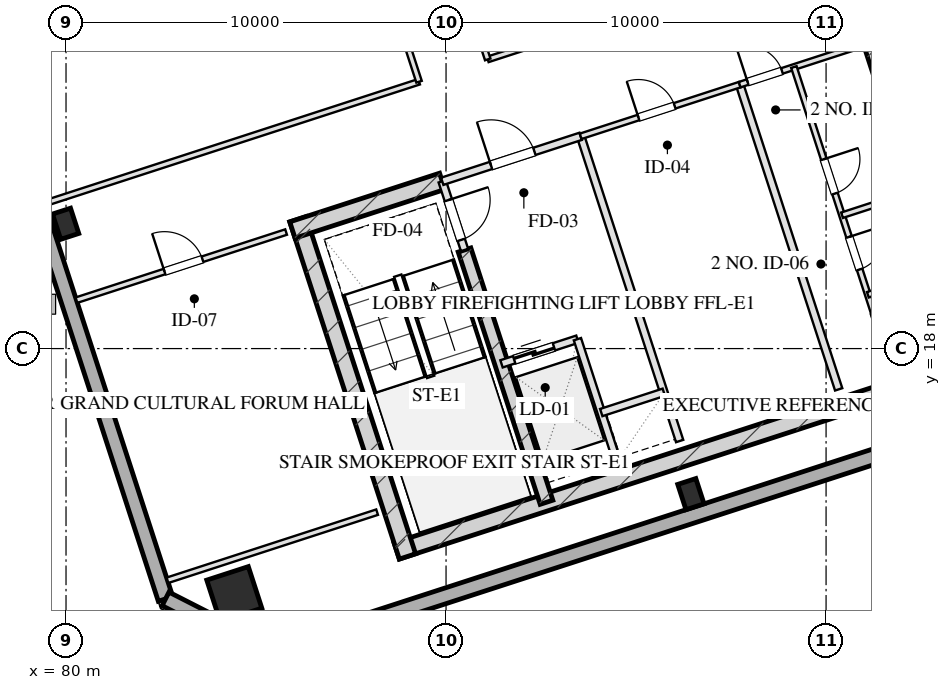
"""IFC4 building model, lengths in metres.
Left out: names, types, materials, properties, quantities, classifications, styles, units other than length and angle.
Written with IfcOpenShell. Run it as: python <this file> out.ifc"""

import sys

from ifc_helpers import new_model, si_unit, direction, frame, frame_2d, origin, origin_2d, place, context, subcontext, project, spatial, rectangle, hollow_rectangle, extrude, element, fill, save


model = new_model("IFC4")
c1 = context("Model", 3, precision=1e-05, world=origin(), true_north=direction((0.0, 1.0)))
c2 = subcontext(c1, "Body", "Model", "MODEL_VIEW")
j1 = project(units=[si_unit("LENGTHUNIT", "METRE"), si_unit("PLANEANGLEUNIT", "RADIAN")], contexts=[c1])
p1 = place(None, origin())
s1 = spatial("IfcSite", under=j1, at=p1, CompositionType="ELEMENT")
p2 = place(p1, origin())
s2 = spatial("IfcBuilding", under=s1, at=p2, CompositionType="ELEMENT")
p3 = place(p2, frame((0.0, 0.0, 205.85)))
s3 = spatial("IfcBuildingStorey", under=s2, at=p3, CompositionType="ELEMENT", Elevation=205.85)
p4 = place(p3, frame((88.701, 12.675, 0.0), z_axis=(0.0, 0.0, 1.0), x_axis=(0.95105824505, 0.309011673763, 0.0)))
e1 = element("IfcWall", 1, at=p4, inside=s3, PredefinedType="SHEAR", context=c2, shape_type="SweptSolid", body=[
    extrude(rectangle(XDim=16.25, YDim=0.45, at=frame_2d((8.125, 0.0))), origin(), (0.0, 0.0, 1.0), 3.45),
])
for number, where, z_axis, x_axis in (
    (2, (86.102, 21.404, 0.0), (0.0, 0.0, 1.0), (0.309, -0.951, 0.0)),
    (3, (101.128, 26.286, 0.0), (0.0, 0.0, 1.0), (0.309, -0.951, 0.0)),
):
    element("IfcWall", number, at=place(p3, frame(where, z_axis=z_axis, x_axis=x_axis)), inside=s3, PredefinedType="SHEAR", context=c2, shape_type="SweptSolid", body=[
        extrude(rectangle(XDim=9.33, YDim=0.45, at=frame_2d((4.665, 0.0))), origin(), (0.0, 0.0, 1.0), 3.45),
    ])
p5 = place(p3, frame((90.486, 20.594, 0.0), z_axis=(0.0, 0.0, 1.0), x_axis=(0.309020428229, -0.951055400562, 0.0)))
e4 = element("IfcWall", 4, at=p5, inside=s3, PredefinedType="SHEAR", context=c2, shape_type="SweptSolid", body=[
    extrude(rectangle(XDim=6.98, YDim=0.35, at=frame_2d((3.49, 0.0))), origin(), (0.0, 0.0, 1.0), 3.45),
])
p6 = place(p3, frame((85.957, 21.12, 0.0), z_axis=(0.0, 0.0, 1.0), x_axis=(0.951064796122, 0.308991510526, 0.0)))
e5 = element("IfcWall", 5, at=p6, inside=s3, PredefinedType="SHEAR", context=c2, shape_type="SweptSolid", body=[
    extrude(rectangle(XDim=4.145, YDim=0.45, at=frame_2d((2.073, 0.0))), origin(), (0.0, 0.0, 1.0), 3.45),
])
p7 = place(p3, frame((84.428, 11.539, 0.0), z_axis=(0.0, 0.0, 1.0), x_axis=(0.951056516295, 0.309016994375, 0.0)))
e6 = element("IfcColumn", 6, at=p7, inside=s3, PredefinedType="COLUMN", context=c2, shape_type="SweptSolid", body=[
    extrude(hollow_rectangle(XDim=1.15, YDim=1.15, WallThickness=0.04, at=origin_2d()), origin(), (0.0, 0.0, 1.0), 3.451),
])
for number, where, z_axis, x_axis in (
    (7, (79.99, 21.284, 0.0), (0.0, 0.0, 1.0), (0.951, 0.309, 0.0)),
    (8, (96.443, 14.17, 0.0), (0.0, 0.0, 1.0), (0.951, 0.309, 0.0)),
):
    element("IfcColumn", number, at=place(p3, frame(where, z_axis=z_axis, x_axis=x_axis)), inside=s3, PredefinedType="COLUMN", context=c2, shape_type="SweptSolid", body=[
        extrude(hollow_rectangle(XDim=0.5, YDim=0.7, WallThickness=0.025, at=origin_2d()), origin(), (0.0, 0.0, 1.0), 3.451),
    ])
p8 = place(p3, frame((82.618, 11.414, 0.0), z_axis=(0.0, 0.0, 1.0), x_axis=(-0.309016491071, 0.951056679828, 0.0)))
e9 = element("IfcWall", 9, at=p8, inside=s3, PredefinedType="SOLIDWALL", context=c2, shape_type="SweptSolid", body=[
    extrude(rectangle(XDim=38.4, YDim=0.4, at=frame_2d((19.2, 0.0))), origin(), (0.0, 0.0, 1.0), 2.61),
])
p9 = place(p8, frame((11.75, 0.0, 0.75)))
e10 = element("IfcOpeningElement", 10, at=p9, cuts=e9, PredefinedType="OPENING", context=c2, shape_type="SweptSolid", body=[
    extrude(rectangle(XDim=2.1, YDim=1.46, at=frame_2d((1.05, 0.73))), frame((0.0, 0.21, 0.0), z_axis=(0.0, -1.0, 0.0), x_axis=(1.0, 0.0, 0.0)), (0.0, 0.0, 1.0), 0.42),
])
p10 = place(p8, frame((15.55, 0.0, 0.75)))
e11 = element("IfcOpeningElement", 11, at=p10, cuts=e9, PredefinedType="OPENING", context=c2, shape_type="SweptSolid", body=[
    extrude(rectangle(XDim=2.1, YDim=1.46, at=frame_2d((1.05, 0.73))), frame((0.0, 0.21, 0.0), z_axis=(0.0, -1.0, 0.0), x_axis=(1.0, 0.0, 0.0)), (0.0, 0.0, 1.0), 0.42),
])
p11 = place(p8, frame((23.05, 0.0, 0.0)))
e12 = element("IfcOpeningElement", 12, at=p11, cuts=e9, PredefinedType="OPENING", context=c2, shape_type="SweptSolid", body=[
    extrude(rectangle(XDim=1.1, YDim=2.15, at=frame_2d((0.55, 1.075))), frame((0.0, 0.21, 0.0), z_axis=(0.0, -1.0, 0.0), x_axis=(1.0, 0.0, 0.0)), (0.0, 0.0, 1.0), 0.42),
])
p12 = place(p3, frame((97.382, 56.586, 0.0), z_axis=(0.0, 0.0, 1.0), x_axis=(0.309016491071, -0.951056679828, 0.0)))
e13 = element("IfcWall", 13, at=p12, inside=s3, PredefinedType="SOLIDWALL", context=c2, shape_type="SweptSolid", body=[
    extrude(rectangle(XDim=38.4, YDim=0.4, at=frame_2d((19.2, 0.0))), origin(), (0.0, 0.0, 1.0), 2.61),
])
p13 = place(p12, frame((24.55, 0.0, 0.75)))
e14 = element("IfcOpeningElement", 14, at=p13, cuts=e13, PredefinedType="OPENING", context=c2, shape_type="SweptSolid", body=[
    extrude(rectangle(XDim=2.1, YDim=1.46, at=frame_2d((1.05, 0.73))), frame((0.0, 0.21, 0.0), z_axis=(0.0, -1.0, 0.0), x_axis=(1.0, 0.0, 0.0)), (0.0, 0.0, 1.0), 0.42),
])
p14 = place(p12, frame((20.75, 0.0, 0.75)))
e15 = element("IfcOpeningElement", 15, at=p14, cuts=e13, PredefinedType="OPENING", context=c2, shape_type="SweptSolid", body=[
    extrude(rectangle(XDim=2.1, YDim=1.46, at=frame_2d((1.05, 0.73))), frame((0.0, 0.21, 0.0), z_axis=(0.0, -1.0, 0.0), x_axis=(1.0, 0.0, 0.0)), (0.0, 0.0, 1.0), 0.42),
])
p15 = place(p12, frame((16.05, 0.0, 0.0)))
e16 = element("IfcOpeningElement", 16, at=p15, cuts=e13, PredefinedType="OPENING", context=c2, shape_type="SweptSolid", body=[
    extrude(rectangle(XDim=1.1, YDim=2.15, at=frame_2d((0.55, 1.075))), frame((0.0, 0.21, 0.0), z_axis=(0.0, -1.0, 0.0), x_axis=(1.0, 0.0, 0.0)), (0.0, 0.0, 1.0), 0.42),
])
p16 = place(p3, frame((107.835, 17.294, 0.0), z_axis=(0.0, 0.0, 1.0), x_axis=(-0.951058012937, -0.309012388148, 0.0)))
e17 = element("IfcWall", 17, at=p16, inside=s3, PredefinedType="SOLIDWALL", context=c2, shape_type="SweptSolid", body=[
    extrude(rectangle(XDim=23.6, YDim=0.4, at=frame_2d((11.8, 0.0))), origin(), (0.0, 0.0, 1.0), 2.61),
])
p17 = place(p3, frame((85.39, 10.001, 0.0), z_axis=(0.0, 0.0, 1.0), x_axis=(-0.890979603174, 0.454043331334, 0.0)))
e18 = element("IfcWall", 18, at=p17, inside=s3, PredefinedType="SOLIDWALL", context=c2, shape_type="SweptSolid", body=[
    extrude(rectangle(XDim=3.111, YDim=0.4, at=frame_2d((1.556, 0.0))), origin(), (0.0, 0.0, 1.0), 2.61),
])
p18 = place(p3, frame((89.899, 22.401, 0.0), z_axis=(0.0, 0.0, 1.0), x_axis=(0.308932062672, -0.951084108086, 0.0)))
e19 = element("IfcWall", 19, at=p18, inside=s3, PredefinedType="PARTITIONING", context=c2, shape_type="SweptSolid", body=[
    extrude(rectangle(XDim=1.9, YDim=0.2, at=frame_2d((0.95, 0.0))), origin(), (0.0, 0.0, 1.0), 3.175),
])
p19 = place(p18, frame((0.52, 0.0, 0.0)))
e20 = element("IfcOpeningElement", 20, at=p19, cuts=e19, PredefinedType="OPENING", context=c2, shape_type="SweptSolid", body=[
    extrude(rectangle(XDim=1.1, YDim=2.05, at=frame_2d((0.55, 1.025))), frame((0.0, 0.11, 0.0), z_axis=(0.0, -1.0, 0.0), x_axis=(1.0, 0.0, 0.0)), (0.0, 0.0, 1.0), 0.22),
])
p20 = place(p3, frame((93.542, 23.585, 0.0), z_axis=(0.0, 0.0, 1.0), x_axis=(0.309042196757, -0.951048327176, 0.0)))
e21 = element("IfcWall", 21, at=p20, inside=s3, PredefinedType="PARTITIONING", context=c2, shape_type="SweptSolid", body=[
    extrude(rectangle(XDim=8.43, YDim=0.2, at=frame_2d((4.215, 0.0))), origin(), (0.0, 0.0, 1.0), 3.175),
])
p21 = place(p3, frame((89.899, 22.401, 0.0), z_axis=(0.0, 0.0, 1.0), x_axis=(0.951046716504, 0.309047153403, 0.0)))
e22 = element("IfcWall", 22, at=p21, inside=s3, PredefinedType="PARTITIONING", context=c2, shape_type="SweptSolid", body=[
    extrude(rectangle(XDim=3.83, YDim=0.2, at=frame_2d((1.915, 0.0))), origin(), (0.0, 0.0, 1.0), 3.175),
])
p22 = place(p21, frame((1.35, 0.0, 0.0)))
e23 = element("IfcOpeningElement", 23, at=p22, cuts=e22, PredefinedType="OPENING", context=c2, shape_type="SweptSolid", body=[
    extrude(rectangle(XDim=1.2, YDim=2.05, at=frame_2d((0.6, 1.025))), frame((0.0, 0.11, 0.0), z_axis=(0.0, -1.0, 0.0), x_axis=(1.0, 0.0, 0.0)), (0.0, 0.0, 1.0), 0.22),
])
p23 = place(p3, frame((91.46, 17.598, 0.0), z_axis=(0.0, 0.0, 1.0), x_axis=(0.951062257173, 0.308999325213, 0.0)))
e24 = element("IfcWall", 24, at=p23, inside=s3, PredefinedType="PARTITIONING", context=c2, shape_type="SweptSolid", body=[
    extrude(rectangle(XDim=2.1, YDim=0.2, at=frame_2d((1.05, 0.0))), origin(), (0.0, 0.0, 1.0), 3.175),
])
p24 = place(p23, frame((0.35, 0.0, 0.0)))
e25 = element("IfcOpeningElement", 25, at=p24, cuts=e24, PredefinedType="OPENING", context=c2, shape_type="SweptSolid", body=[
    extrude(rectangle(XDim=1.1, YDim=2.05, at=frame_2d((0.55, 1.025))), frame((0.0, 0.11, 0.0), z_axis=(0.0, -1.0, 0.0), x_axis=(1.0, 0.0, 0.0)), (0.0, 0.0, 1.0), 0.22),
])
p25 = place(p3, frame((93.457, 18.247, 0.0), z_axis=(0.0, 0.0, 1.0), x_axis=(0.3089935693, -0.951064127245, 0.0)))
e26 = element("IfcWall", 26, at=p25, inside=s3, PredefinedType="PARTITIONING", context=c2, shape_type="SweptSolid", body=[
    extrude(rectangle(XDim=3.7, YDim=0.2, at=frame_2d((1.85, 0.0))), origin(), (0.0, 0.0, 1.0), 3.175),
])
p26 = place(p3, frame((94.084, 16.317, 0.0), z_axis=(0.0, 0.0, 1.0), x_axis=(0.951041328149, 0.309063734775, 0.0)))
e27 = element("IfcWall", 27, at=p26, inside=s3, PredefinedType="PARTITIONING", context=c2, shape_type="SweptSolid", body=[
    extrude(rectangle(XDim=1.73, YDim=0.2, at=frame_2d((0.865, 0.0))), origin(), (0.0, 0.0, 1.0), 3.175),
])
p27 = place(p3, frame((97.727, 24.944, 0.0), z_axis=(0.0, 0.0, 1.0), x_axis=(0.309016001439, -0.951056838919, 0.0)))
e28 = element("IfcWall", 28, at=p27, inside=s3, PredefinedType="PARTITIONING", context=c2, shape_type="SweptSolid", body=[
    extrude(rectangle(XDim=8.43, YDim=0.2, at=frame_2d((4.215, 0.0))), origin(), (0.0, 0.0, 1.0), 3.175),
])
p28 = place(p3, frame((93.542, 23.585, 0.0), z_axis=(0.0, 0.0, 1.0), x_axis=(0.951063829732, 0.308994485023, 0.0)))
e29 = element("IfcWall", 29, at=p28, inside=s3, PredefinedType="PARTITIONING", context=c2, shape_type="SweptSolid", body=[
    extrude(rectangle(XDim=4.4, YDim=0.15, at=frame_2d((2.2, 0.0))), origin(), (0.0, 0.0, 1.0), 3.175),
])
p29 = place(p28, frame((1.6, 0.0, 0.0)))
e30 = element("IfcOpeningElement", 30, at=p29, cuts=e29, PredefinedType="OPENING", context=c2, shape_type="SweptSolid", body=[
    extrude(rectangle(XDim=1.0, YDim=2.05, at=frame_2d((0.5, 1.025))), frame((0.0, 0.085, 0.0), z_axis=(0.0, -1.0, 0.0), x_axis=(1.0, 0.0, 0.0)), (0.0, 0.0, 1.0), 0.17),
])
p30 = place(p3, frame((97.727, 24.944, 0.0), z_axis=(0.0, 0.0, 1.0), x_axis=(0.951036872128, 0.309077446369, 0.0)))
e31 = element("IfcWall", 31, at=p30, inside=s3, PredefinedType="PARTITIONING", context=c2, shape_type="SweptSolid", body=[
    extrude(rectangle(XDim=3.2, YDim=0.15, at=frame_2d((1.6, 0.0))), origin(), (0.0, 0.0, 1.0), 3.175),
])
p31 = place(p30, frame((0.22, 0.0, 0.0)))
e32 = element("IfcOpeningElement", 32, at=p31, cuts=e31, PredefinedType="OPENING", context=c2, shape_type="SweptSolid", body=[
    extrude(rectangle(XDim=0.95, YDim=2.05, at=frame_2d((0.475, 1.025))), frame((0.0, 0.085, 0.0), z_axis=(0.0, -1.0, 0.0), x_axis=(1.0, 0.0, 0.0)), (0.0, 0.0, 1.0), 0.17),
])
p32 = place(p3, frame((99.153, 25.408, 0.0), z_axis=(0.0, 0.0, 1.0), x_axis=(0.309016001439, -0.951056838919, 0.0)))
e33 = element("IfcWall", 33, at=p32, inside=s3, PredefinedType="PARTITIONING", context=c2, shape_type="SweptSolid", body=[
    extrude(rectangle(XDim=8.43, YDim=0.15, at=frame_2d((4.215, 0.0))), origin(), (0.0, 0.0, 1.0), 3.175),
])
p33 = place(p32, frame((2.55, 0.0, 0.0)))
e34 = element("IfcOpeningElement", 34, at=p33, cuts=e33, PredefinedType="OPENING", context=c2, shape_type="SweptSolid", body=[
    extrude(rectangle(XDim=0.95, YDim=2.05, at=frame_2d((0.475, 1.025))), frame((0.0, 0.085, 0.0), z_axis=(0.0, -1.0, 0.0), x_axis=(1.0, 0.0, 0.0)), (0.0, 0.0, 1.0), 0.17),
])
p34 = place(p32, frame((4.7, 0.0, 0.0)))
e35 = element("IfcOpeningElement", 35, at=p34, cuts=e33, PredefinedType="OPENING", context=c2, shape_type="SweptSolid", body=[
    extrude(rectangle(XDim=0.9, YDim=2.05, at=frame_2d((0.45, 1.025))), frame((0.0, 0.085, 0.0), z_axis=(0.0, -1.0, 0.0), x_axis=(1.0, 0.0, 0.0)), (0.0, 0.0, 1.0), 0.17),
])
p35 = place(p32, frame((6.8, 0.0, 0.0)))
e36 = element("IfcOpeningElement", 36, at=p35, cuts=e33, PredefinedType="OPENING", context=c2, shape_type="SweptSolid", body=[
    extrude(rectangle(XDim=0.9, YDim=2.05, at=frame_2d((0.45, 1.025))), frame((0.0, 0.085, 0.0), z_axis=(0.0, -1.0, 0.0), x_axis=(1.0, 0.0, 0.0)), (0.0, 0.0, 1.0), 0.17),
])
p36 = place(p3, frame((100.42, 21.509, 0.0), z_axis=(0.0, 0.0, 1.0), x_axis=(0.951040401051, 0.309066587596, 0.0)))
e37 = element("IfcWall", 37, at=p36, inside=s3, PredefinedType="PARTITIONING", context=c2, shape_type="SweptSolid", body=[
    extrude(rectangle(XDim=1.7, YDim=0.15, at=frame_2d((0.85, 0.0))), origin(), (0.0, 0.0, 1.0), 3.175),
])
p37 = place(p3, frame((101.1, 19.416, 0.0), z_axis=(0.0, 0.0, 1.0), x_axis=(0.951054116971, 0.309024378638, 0.0)))
e38 = element("IfcWall", 38, at=p37, inside=s3, PredefinedType="PARTITIONING", context=c2, shape_type="SweptSolid", body=[
    extrude(rectangle(XDim=1.7, YDim=0.15, at=frame_2d((0.85, 0.0))), origin(), (0.0, 0.0, 1.0), 3.175),
])
p38 = place(p3, frame((82.669, 11.903, 0.0), z_axis=(0.0, 0.0, 1.0), x_axis=(0.951059431056, 0.309008023519, 0.0)))
e39 = element("IfcWall", 39, at=p38, inside=s3, PredefinedType="PARTITIONING", context=c2, shape_type="SweptSolid", body=[
    extrude(rectangle(XDim=5.8, YDim=0.15, at=frame_2d((2.9, 0.0))), origin(), (0.0, 0.0, 1.0), 3.175),
])
p39 = place(p3, frame((80.275, 19.274, 0.0), z_axis=(0.0, 0.0, 1.0), x_axis=(0.951059431056, 0.309008023519, 0.0)))
e40 = element("IfcWall", 40, at=p39, inside=s3, PredefinedType="PARTITIONING", context=c2, shape_type="SweptSolid", body=[
    extrude(rectangle(XDim=5.8, YDim=0.15, at=frame_2d((2.9, 0.0))), origin(), (0.0, 0.0, 1.0), 3.175),
])
p40 = place(p39, frame((2.436, 0.0, 0.0)))
e41 = element("IfcOpeningElement", 41, at=p40, cuts=e40, PredefinedType="OPENING", context=c2, shape_type="SweptSolid", body=[
    extrude(rectangle(XDim=1.05, YDim=2.05, at=frame_2d((0.525, 1.025))), frame((0.0, 0.085, 0.0), z_axis=(0.0, -1.0, 0.0), x_axis=(1.0, 0.0, 0.0)), (0.0, 0.0, 1.0), 0.17),
])
p41 = place(p3, frame((79.447, 21.823, 0.0), z_axis=(0.0, 0.0, 1.0), x_axis=(0.951057294912, 0.309014598029, 0.0)))
e42 = element("IfcWall", 42, at=p41, inside=s3, PredefinedType="PARTITIONING", context=c2, shape_type="SweptSolid", body=[
    extrude(rectangle(XDim=10.35, YDim=0.15, at=frame_2d((5.175, 0.0))), origin(), (0.0, 0.0, 1.0), 3.175),
])
p42 = place(p3, frame((91.097, 25.608, 0.0), z_axis=(0.0, 0.0, 1.0), x_axis=(0.951053063704, 0.309027620156, 0.0)))
e43 = element("IfcWall", 43, at=p42, inside=s3, PredefinedType="PARTITIONING", context=c2, shape_type="SweptSolid", body=[
    extrude(rectangle(XDim=9.35, YDim=0.15, at=frame_2d((4.675, 0.0))), origin(), (0.0, 0.0, 1.0), 3.175),
])
p43 = place(p3, frame((89.29, 25.021, 0.0), z_axis=(0.0, 0.0, 1.0), x_axis=(-0.309004459387, 0.951060589068, 0.0)))
e44 = element("IfcWall", 44, at=p43, inside=s3, PredefinedType="PARTITIONING", context=c2, shape_type="SweptSolid", body=[
    extrude(rectangle(XDim=16.64, YDim=0.15, at=frame_2d((8.32, 0.0))), origin(), (0.0, 0.0, 1.0), 3.175),
])
p44 = place(p43, frame((3.107, 0.0, 0.0)))
e45 = element("IfcOpeningElement", 45, at=p44, cuts=e44, PredefinedType="OPENING", context=c2, shape_type="SweptSolid", body=[
    extrude(rectangle(XDim=1.0, YDim=2.05, at=frame_2d((0.5, 1.025))), frame((0.0, 0.085, 0.0), z_axis=(0.0, -1.0, 0.0), x_axis=(1.0, 0.0, 0.0)), (0.0, 0.0, 1.0), 0.17),
])
p45 = place(p43, frame((11.427, 0.0, 0.0)))
e46 = element("IfcOpeningElement", 46, at=p45, cuts=e44, PredefinedType="OPENING", context=c2, shape_type="SweptSolid", body=[
    extrude(rectangle(XDim=1.0, YDim=2.05, at=frame_2d((0.5, 1.025))), frame((0.0, 0.085, 0.0), z_axis=(0.0, -1.0, 0.0), x_axis=(1.0, 0.0, 0.0)), (0.0, 0.0, 1.0), 0.17),
])
p46 = place(p3, frame((91.097, 25.608, 0.0), z_axis=(0.0, 0.0, 1.0), x_axis=(-0.30901773025, 0.951056277195, 0.0)))
e47 = element("IfcWall", 47, at=p46, inside=s3, PredefinedType="PARTITIONING", context=c2, shape_type="SweptSolid", body=[
    extrude(rectangle(XDim=16.64, YDim=0.15, at=frame_2d((8.32, 0.0))), origin(), (0.0, 0.0, 1.0), 3.175),
])
p47 = place(p46, frame((7.987, 0.0, 0.0)))
e48 = element("IfcOpeningElement", 48, at=p47, cuts=e47, PredefinedType="OPENING", context=c2, shape_type="SweptSolid", body=[
    extrude(rectangle(XDim=1.1, YDim=2.05, at=frame_2d((0.55, 1.025))), frame((0.0, 0.085, 0.0), z_axis=(0.0, -1.0, 0.0), x_axis=(1.0, 0.0, 0.0)), (0.0, 0.0, 1.0), 0.17),
])
p48 = place(p19, origin())
e49 = element("IfcDoor", 49, at=p48, inside=s3, OperationType="SINGLE_SWING_LEFT", PredefinedType="DOOR", context=c2, shape_type="SweptSolid", body=[
    extrude(rectangle(XDim=1.1, YDim=2.05, at=frame_2d((0.55, 1.025))), frame((0.0, 0.025, 0.0), z_axis=(0.0, -1.0, 0.0), x_axis=(1.0, 0.0, 0.0)), (0.0, 0.0, 1.0), 0.05),
])
fill(e20, e49)
p49 = place(p22, origin())
e50 = element("IfcDoor", 50, at=p49, inside=s3, OperationType="SINGLE_SWING_LEFT", PredefinedType="DOOR", context=c2, shape_type="SweptSolid", body=[
    extrude(rectangle(XDim=1.2, YDim=2.05, at=frame_2d((0.6, 1.025))), frame((0.0, 0.025, 0.0), z_axis=(0.0, -1.0, 0.0), x_axis=(1.0, 0.0, 0.0)), (0.0, 0.0, 1.0), 0.05),
])
fill(e23, e50)
p50 = place(p24, origin())
e51 = element("IfcDoor", 51, at=p50, inside=s3, OperationType="DOUBLE_DOOR_SLIDING", PredefinedType="DOOR", context=c2, shape_type="SweptSolid", body=[
    extrude(rectangle(XDim=1.1, YDim=2.05, at=frame_2d((0.55, 1.025))), frame((0.0, 0.025, 0.0), z_axis=(0.0, -1.0, 0.0), x_axis=(1.0, 0.0, 0.0)), (0.0, 0.0, 1.0), 0.05),
])
fill(e25, e51)
p51 = place(p29, origin())
e52 = element("IfcDoor", 52, at=p51, inside=s3, OperationType="SINGLE_SWING_LEFT", PredefinedType="DOOR", context=c2, shape_type="SweptSolid", body=[
    extrude(rectangle(XDim=1.0, YDim=2.05, at=frame_2d((0.5, 1.025))), frame((0.0, 0.025, 0.0), z_axis=(0.0, -1.0, 0.0), x_axis=(1.0, 0.0, 0.0)), (0.0, 0.0, 1.0), 0.05),
])
fill(e30, e52)
p52 = place(p31, origin())
e53 = element("IfcDoor", 53, at=p52, inside=s3, OperationType="SINGLE_SWING_LEFT", PredefinedType="DOOR", context=c2, shape_type="SweptSolid", body=[
    extrude(rectangle(XDim=0.95, YDim=2.05, at=frame_2d((0.475, 1.025))), frame((0.0, 0.025, 0.0), z_axis=(0.0, -1.0, 0.0), x_axis=(1.0, 0.0, 0.0)), (0.0, 0.0, 1.0), 0.05),
])
fill(e32, e53)
p53 = place(p33, origin())
e54 = element("IfcDoor", 54, at=p53, inside=s3, OperationType="SINGLE_SWING_LEFT", PredefinedType="DOOR", context=c2, shape_type="SweptSolid", body=[
    extrude(rectangle(XDim=0.95, YDim=2.05, at=frame_2d((0.475, 1.025))), frame((0.0, 0.025, 0.0), z_axis=(0.0, -1.0, 0.0), x_axis=(1.0, 0.0, 0.0)), (0.0, 0.0, 1.0), 0.05),
])
fill(e34, e54)
p54 = place(p34, origin())
e55 = element("IfcDoor", 55, at=p54, inside=s3, OperationType="SINGLE_SWING_LEFT", PredefinedType="DOOR", context=c2, shape_type="SweptSolid", body=[
    extrude(rectangle(XDim=0.9, YDim=2.05, at=frame_2d((0.45, 1.025))), frame((0.0, 0.025, 0.0), z_axis=(0.0, -1.0, 0.0), x_axis=(1.0, 0.0, 0.0)), (0.0, 0.0, 1.0), 0.05),
])
fill(e35, e55)
p55 = place(p40, origin())
e56 = element("IfcDoor", 56, at=p55, inside=s3, OperationType="SINGLE_SWING_LEFT", PredefinedType="DOOR", context=c2, shape_type="SweptSolid", body=[
    extrude(rectangle(XDim=1.05, YDim=2.05, at=frame_2d((0.525, 1.025))), frame((0.0, 0.025, 0.0), z_axis=(0.0, -1.0, 0.0), x_axis=(1.0, 0.0, 0.0)), (0.0, 0.0, 1.0), 0.05),
])
fill(e41, e56)
save(model, sys.argv[1])
